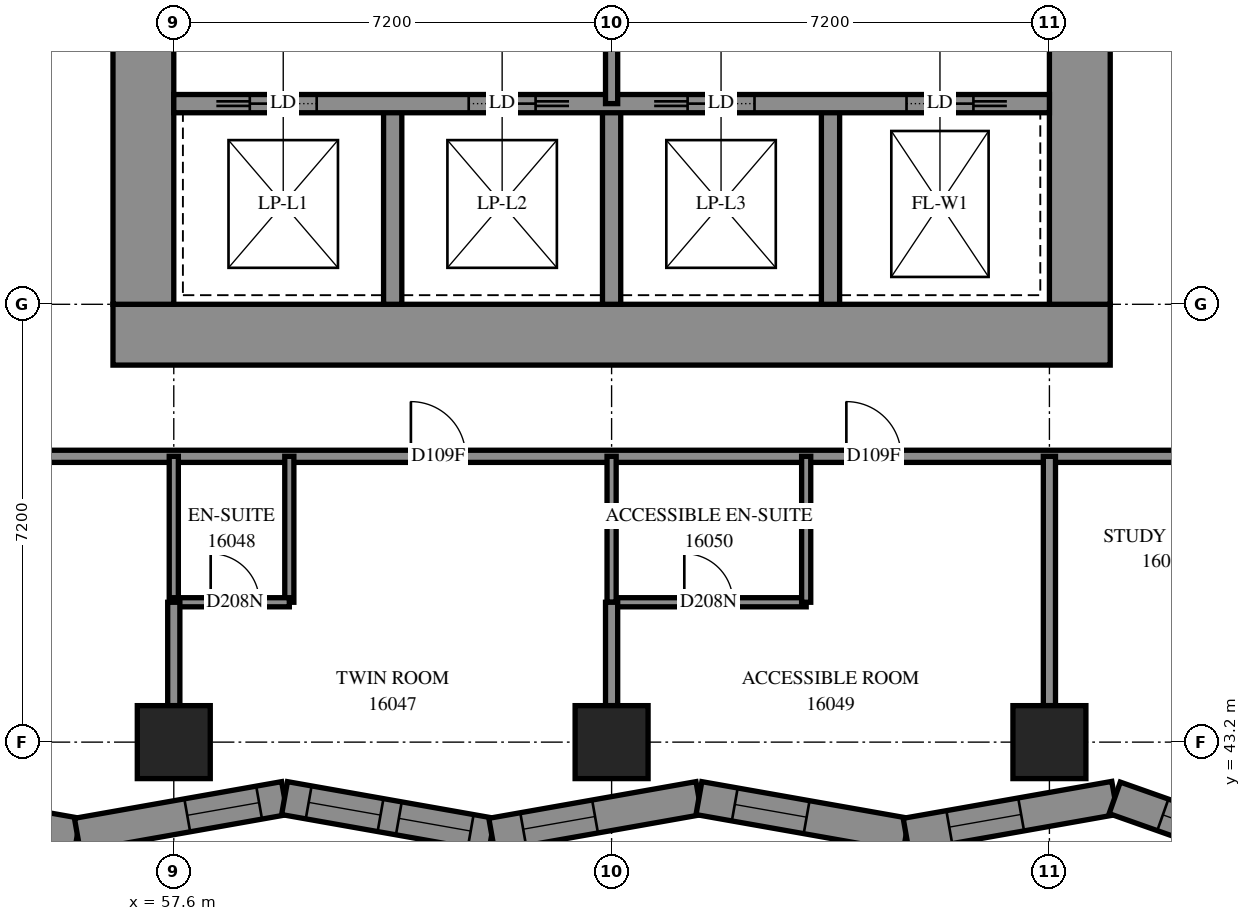
"""IFC4 building model, lengths in metres.
Left out: names, types, materials, properties, quantities, classifications, styles, units other than length and angle.
Written with IfcOpenShell. Run it as: python <this file> out.ifc"""

import sys

from ifc_helpers import new_model, si_unit, direction, frame, frame_2d, origin, origin_2d, place, context, subcontext, project, spatial, polyline, rectangle, outline, extrude, element, fill, save


model = new_model("IFC4")
c1 = context("Model", 3, precision=1e-05, world=origin(), true_north=direction((0.0, 1.0)))
c2 = subcontext(c1, "Body", "Model", "MODEL_VIEW")
j1 = project(units=[si_unit("LENGTHUNIT", "METRE"), si_unit("PLANEANGLEUNIT", "RADIAN")], contexts=[c1])
p1 = place(None, origin())
s1 = spatial("IfcSite", under=j1, at=p1, CompositionType="ELEMENT")
p2 = place(p1, origin())
s2 = spatial("IfcBuilding", under=s1, at=p2, CompositionType="ELEMENT")
p3 = place(p2, frame((0.0, 0.0, 61.0)))
s3 = spatial("IfcBuildingStorey", under=s2, at=p3, CompositionType="ELEMENT", Elevation=61.0)
for number, where, z_axis, x_axis in (
    (1, (57.6, 43.2, 0.0), (0.0, 0.0, 1.0), (1.0, 0.0, 0.0)),
    (2, (64.8, 43.2, 0.0), (0.0, 0.0, 1.0), (1.0, 0.0, 0.0)),
    (3, (72.0, 43.2, 0.0), (0.0, 0.0, 1.0), (1.0, 0.0, 0.0)),
):
    element("IfcColumn", number, at=place(p3, frame(where, z_axis=z_axis, x_axis=x_axis)), inside=s3, PredefinedType="COLUMN", context=c2, shape_type="SweptSolid", body=[
        extrude(rectangle(XDim=1.2, YDim=1.2, at=origin_2d()), origin(), (0.0, 0.0, 1.0), 3.1),
    ])
p4 = place(p3, frame((56.6, 49.9, -0.3), z_axis=(0.0, 0.0, 1.0), x_axis=(1.0, 0.0, 0.0)))
e4 = element("IfcWall", 4, at=p4, inside=s3, PredefinedType="SHEAR", context=c2, shape_type="SweptSolid", body=[
    extrude(rectangle(XDim=16.4, YDim=1.0, at=frame_2d((8.2, 0.0))), origin(), (0.0, 0.0, 1.0), 2.7),
])
p5 = place(p3, frame((57.1, 50.4, -0.3), z_axis=(0.0, 0.0, 1.0), x_axis=(0.0, 1.0, 0.0)))
e5 = element("IfcWall", 5, at=p5, inside=s3, PredefinedType="SHEAR", context=c2, shape_type="SweptSolid", body=[
    extrude(rectangle(XDim=14.4, YDim=1.0, at=frame_2d((7.2, 0.0))), origin(), (0.0, 0.0, 1.0), 2.7),
])
p6 = place(p5, frame((4.55, 0.0, 0.3)))
e6 = element("IfcOpeningElement", 6, at=p6, cuts=e5, PredefinedType="OPENING", context=c2, shape_type="SweptSolid", body=[
    extrude(rectangle(XDim=1.1, YDim=2.1, at=frame_2d((0.55, 1.05))), frame((0.0, 0.51, 0.0), z_axis=(0.0, -1.0, 0.0), x_axis=(1.0, 0.0, 0.0)), (0.0, 0.0, 1.0), 1.02),
])
p7 = place(p5, frame((11.35, 0.0, 0.3)))
e7 = element("IfcOpeningElement", 7, at=p7, cuts=e5, PredefinedType="OPENING", context=c2, shape_type="SweptSolid", body=[
    extrude(rectangle(XDim=1.1, YDim=2.1, at=frame_2d((0.55, 1.05))), frame((0.0, 0.51, 0.0), z_axis=(0.0, -1.0, 0.0), x_axis=(1.0, 0.0, 0.0)), (0.0, 0.0, 1.0), 1.02),
])
p8 = place(p3, frame((72.5, 50.4, -0.3), z_axis=(0.0, 0.0, 1.0), x_axis=(0.0, 1.0, 0.0)))
e8 = element("IfcWall", 8, at=p8, inside=s3, PredefinedType="SHEAR", context=c2, shape_type="SweptSolid", body=[
    extrude(rectangle(XDim=14.4, YDim=1.0, at=frame_2d((7.2, 0.0))), origin(), (0.0, 0.0, 1.0), 2.7),
])
p9 = place(p8, frame((4.55, 0.0, 0.3)))
e9 = element("IfcOpeningElement", 9, at=p9, cuts=e8, PredefinedType="OPENING", context=c2, shape_type="SweptSolid", body=[
    extrude(rectangle(XDim=1.1, YDim=2.1, at=frame_2d((0.55, 1.05))), frame((0.0, 0.51, 0.0), z_axis=(0.0, -1.0, 0.0), x_axis=(1.0, 0.0, 0.0)), (0.0, 0.0, 1.0), 1.02),
])
p10 = place(p8, frame((11.35, 0.0, 0.3)))
e10 = element("IfcOpeningElement", 10, at=p10, cuts=e8, PredefinedType="OPENING", context=c2, shape_type="SweptSolid", body=[
    extrude(rectangle(XDim=1.1, YDim=2.1, at=frame_2d((0.55, 1.05))), frame((0.0, 0.51, 0.0), z_axis=(0.0, -1.0, 0.0), x_axis=(1.0, 0.0, 0.0)), (0.0, 0.0, 1.0), 1.02),
])
for number, where, z_axis, x_axis in (
    (11, (61.2, 50.4, 0.0), (0.0, 0.0, 1.0), (0.0, 1.0, 0.0)),
    (12, (64.8, 50.4, 0.0), (0.0, 0.0, 1.0), (0.0, 1.0, 0.0)),
    (13, (68.4, 50.4, 0.0), (0.0, 0.0, 1.0), (0.0, 1.0, 0.0)),
):
    element("IfcWall", number, at=place(p3, frame(where, z_axis=z_axis, x_axis=x_axis)), inside=s3, PredefinedType="SOLIDWALL", context=c2, shape_type="SweptSolid", body=[
        extrude(rectangle(XDim=3.3, YDim=0.3, at=frame_2d((1.65, 0.0))), origin(), (0.0, 0.0, 1.0), 3.1),
    ])
p11 = place(p3, frame((57.6, 53.7, 0.0), z_axis=(0.0, 0.0, 1.0), x_axis=(1.0, 0.0, 0.0)))
e14 = element("IfcWall", 14, at=p11, inside=s3, PredefinedType="SOLIDWALL", context=c2, shape_type="SweptSolid", body=[
    extrude(rectangle(XDim=14.4, YDim=0.3, at=frame_2d((7.2, 0.0))), origin(), (0.0, 0.0, 1.0), 3.1),
])
p12 = place(p11, frame((1.25, 0.0, 0.0)))
e15 = element("IfcOpeningElement", 15, at=p12, cuts=e14, PredefinedType="OPENING", context=c2, shape_type="SweptSolid", body=[
    extrude(rectangle(XDim=1.1, YDim=2.1, at=frame_2d((0.55, 1.05))), frame((0.0, 0.16, 0.0), z_axis=(0.0, -1.0, 0.0), x_axis=(1.0, 0.0, 0.0)), (0.0, 0.0, 1.0), 0.32),
])
p13 = place(p11, frame((4.85, 0.0, 0.0)))
e16 = element("IfcOpeningElement", 16, at=p13, cuts=e14, PredefinedType="OPENING", context=c2, shape_type="SweptSolid", body=[
    extrude(rectangle(XDim=1.1, YDim=2.1, at=frame_2d((0.55, 1.05))), frame((0.0, 0.16, 0.0), z_axis=(0.0, -1.0, 0.0), x_axis=(1.0, 0.0, 0.0)), (0.0, 0.0, 1.0), 0.32),
])
p14 = place(p11, frame((8.45, 0.0, 0.0)))
e17 = element("IfcOpeningElement", 17, at=p14, cuts=e14, PredefinedType="OPENING", context=c2, shape_type="SweptSolid", body=[
    extrude(rectangle(XDim=1.1, YDim=2.1, at=frame_2d((0.55, 1.05))), frame((0.0, 0.16, 0.0), z_axis=(0.0, -1.0, 0.0), x_axis=(1.0, 0.0, 0.0)), (0.0, 0.0, 1.0), 0.32),
])
p15 = place(p11, frame((12.05, 0.0, 0.0)))
e18 = element("IfcOpeningElement", 18, at=p15, cuts=e14, PredefinedType="OPENING", context=c2, shape_type="SweptSolid", body=[
    extrude(rectangle(XDim=1.1, YDim=2.1, at=frame_2d((0.55, 1.05))), frame((0.0, 0.16, 0.0), z_axis=(0.0, -1.0, 0.0), x_axis=(1.0, 0.0, 0.0)), (0.0, 0.0, 1.0), 0.32),
])
p16 = place(p3, frame((52.584, 42.283, 0.0), z_axis=(0.0, 0.0, 1.0), x_axis=(0.9846990638, -0.1742634606, 0.0)))
e19 = element("IfcWall", 19, at=p16, inside=s3, PredefinedType="SOLIDWALL", context=c2, shape_type="SweptSolid", body=[
    extrude(outline(polyline([(0.072, -0.275), (3.533, -0.275), (3.435, 0.275), (-0.072, 0.275), (0.072, -0.275)])), origin(), (0.0, 0.0, 1.0), 3.1),
])
p17 = place(p16, frame((1.737, 0.0, 0.5)))
e20 = element("IfcOpeningElement", 20, at=p17, cuts=e19, PredefinedType="OPENING", context=c2, shape_type="SweptSolid", body=[
    extrude(rectangle(XDim=1.2, YDim=2.45, at=frame_2d((0.6, 1.225))), frame((0.0, 0.285, 0.0), z_axis=(0.0, -1.0, 0.0), x_axis=(1.0, 0.0, 0.0)), (0.0, 0.0, 1.0), 0.57),
])
p18 = place(p3, frame((56.014, 41.676, 0.0), z_axis=(0.0, 0.0, 1.0), x_axis=(0.9846979018, 0.1742700266, 0.0)))
e21 = element("IfcWall", 21, at=p18, inside=s3, PredefinedType="SOLIDWALL", context=c2, shape_type="SweptSolid", body=[
    extrude(outline(polyline([(-0.049, -0.275), (3.412, -0.275), (3.509, 0.275), (0.049, 0.275), (-0.049, -0.275)])), origin(), (0.0, 0.0, 1.0), 3.1),
])
p19 = place(p18, frame((1.835, 0.0, 0.5)))
e22 = element("IfcOpeningElement", 22, at=p19, cuts=e21, PredefinedType="OPENING", context=c2, shape_type="SweptSolid", body=[
    extrude(rectangle(XDim=1.2, YDim=2.45, at=frame_2d((0.6, 1.225))), frame((0.0, 0.285, 0.0), z_axis=(0.0, -1.0, 0.0), x_axis=(1.0, 0.0, 0.0)), (0.0, 0.0, 1.0), 0.57),
])
p20 = place(p3, frame((59.422, 42.279, 0.0), z_axis=(0.0, 0.0, 1.0), x_axis=(0.9846979018, -0.1742700266, 0.0)))
e23 = element("IfcWall", 23, at=p20, inside=s3, PredefinedType="SOLIDWALL", context=c2, shape_type="SweptSolid", body=[
    extrude(outline(polyline([(0.049, -0.275), (3.509, -0.275), (3.412, 0.275), (-0.049, 0.275), (0.049, -0.275)])), origin(), (0.0, 0.0, 1.0), 3.1),
])
p21 = place(p20, frame((0.403, 0.0, 0.5)))
e24 = element("IfcOpeningElement", 24, at=p21, cuts=e23, PredefinedType="OPENING", context=c2, shape_type="SweptSolid", body=[
    extrude(rectangle(XDim=1.2, YDim=2.45, at=frame_2d((0.6, 1.225))), frame((0.0, 0.285, 0.0), z_axis=(0.0, -1.0, 0.0), x_axis=(1.0, 0.0, 0.0)), (0.0, 0.0, 1.0), 0.57),
])
p22 = place(p20, frame((1.909, 0.0, 0.5)))
e25 = element("IfcOpeningElement", 25, at=p22, cuts=e23, PredefinedType="OPENING", context=c2, shape_type="SweptSolid", body=[
    extrude(rectangle(XDim=1.2, YDim=2.45, at=frame_2d((0.6, 1.225))), frame((0.0, 0.285, 0.0), z_axis=(0.0, -1.0, 0.0), x_axis=(1.0, 0.0, 0.0)), (0.0, 0.0, 1.0), 0.57),
])
p23 = place(p3, frame((62.829, 41.676, 0.0), z_axis=(0.0, 0.0, 1.0), x_axis=(0.9846979018, 0.1742700266, 0.0)))
e26 = element("IfcWall", 26, at=p23, inside=s3, PredefinedType="SOLIDWALL", context=c2, shape_type="SweptSolid", body=[
    extrude(outline(polyline([(-0.049, -0.275), (3.412, -0.275), (3.509, 0.275), (0.049, 0.275), (-0.049, -0.275)])), origin(), (0.0, 0.0, 1.0), 3.1),
])
p24 = place(p23, frame((0.525, 0.0, 0.5)))
e27 = element("IfcOpeningElement", 27, at=p24, cuts=e26, PredefinedType="OPENING", context=c2, shape_type="SweptSolid", body=[
    extrude(rectangle(XDim=1.2, YDim=2.45, at=frame_2d((0.6, 1.225))), frame((0.0, 0.285, 0.0), z_axis=(0.0, -1.0, 0.0), x_axis=(1.0, 0.0, 0.0)), (0.0, 0.0, 1.0), 0.57),
])
p25 = place(p3, frame((66.236, 42.279, 0.0), z_axis=(0.0, 0.0, 1.0), x_axis=(0.9846979018, -0.1742700266, 0.0)))
e28 = element("IfcWall", 28, at=p25, inside=s3, PredefinedType="SOLIDWALL", context=c2, shape_type="SweptSolid", body=[
    extrude(outline(polyline([(0.049, -0.275), (3.509, -0.275), (3.412, 0.275), (-0.049, 0.275), (0.049, -0.275)])), origin(), (0.0, 0.0, 1.0), 3.1),
])
p26 = place(p25, frame((0.599, 0.0, 0.5)))
e29 = element("IfcOpeningElement", 29, at=p26, cuts=e28, PredefinedType="OPENING", context=c2, shape_type="SweptSolid", body=[
    extrude(rectangle(XDim=1.2, YDim=2.45, at=frame_2d((0.6, 1.225))), frame((0.0, 0.285, 0.0), z_axis=(0.0, -1.0, 0.0), x_axis=(1.0, 0.0, 0.0)), (0.0, 0.0, 1.0), 0.57),
])
p27 = place(p3, frame((69.643, 41.676, 0.0), z_axis=(0.0, 0.0, 1.0), x_axis=(0.9846990638, 0.1742634606, 0.0)))
e30 = element("IfcWall", 30, at=p27, inside=s3, PredefinedType="SOLIDWALL", context=c2, shape_type="SweptSolid", body=[
    extrude(outline(polyline([(-0.049, -0.275), (3.412, -0.275), (3.556, 0.275), (0.049, 0.275), (-0.049, -0.275)])), origin(), (0.0, 0.0, 1.0), 3.1),
])
p28 = place(p27, frame((0.721, 0.0, 0.5)))
e31 = element("IfcOpeningElement", 31, at=p28, cuts=e30, PredefinedType="OPENING", context=c2, shape_type="SweptSolid", body=[
    extrude(rectangle(XDim=1.2, YDim=2.45, at=frame_2d((0.6, 1.225))), frame((0.0, 0.285, 0.0), z_axis=(0.0, -1.0, 0.0), x_axis=(1.0, 0.0, 0.0)), (0.0, 0.0, 1.0), 0.57),
])
p29 = place(p3, frame((73.074, 42.283, 0.0), z_axis=(0.0, 0.0, 1.0), x_axis=(0.9429519654, -0.3329288077, 0.0)))
e32 = element("IfcWall", 32, at=p29, inside=s3, PredefinedType="SOLIDWALL", context=c2, shape_type="SweptSolid", body=[
    extrude(outline(polyline([(0.072, -0.275), (3.686, -0.275), (3.725, 0.275), (-0.072, 0.275), (0.072, -0.275)])), origin(), (0.0, 0.0, 1.0), 3.1),
])
p30 = place(p29, frame((0.84, 0.0, 0.5)))
e33 = element("IfcOpeningElement", 33, at=p30, cuts=e32, PredefinedType="OPENING", context=c2, shape_type="SweptSolid", body=[
    extrude(rectangle(XDim=1.2, YDim=2.45, at=frame_2d((0.6, 1.225))), frame((0.0, 0.285, 0.0), z_axis=(0.0, -1.0, 0.0), x_axis=(1.0, 0.0, 0.0)), (0.0, 0.0, 1.0), 0.57),
])
p31 = place(p3, frame((64.8, 53.7, 0.0), z_axis=(0.0, 0.0, 1.0), x_axis=(0.0, 1.0, 0.0)))
e34 = element("IfcWall", 34, at=p31, inside=s3, PredefinedType="PARTITIONING", context=c2, shape_type="SweptSolid", body=[
    extrude(rectangle(XDim=3.6, YDim=0.2, at=frame_2d((1.8, 0.0))), origin(), (0.0, 0.0, 1.0), 3.1),
])
p32 = place(p3, frame((55.1, 47.9, 0.0), z_axis=(0.0, 0.0, 1.0), x_axis=(1.0, 0.0, 0.0)))
e35 = element("IfcWall", 35, at=p32, inside=s3, PredefinedType="PARTITIONING", context=c2, shape_type="SweptSolid", body=[
    extrude(rectangle(XDim=19.208, YDim=0.2, at=frame_2d((9.604, 0.0))), origin(), (0.0, 0.0, 1.0), 3.1),
])
p33 = place(p32, frame((6.399, 0.0, 0.0)))
e36 = element("IfcOpeningElement", 36, at=p33, cuts=e35, PredefinedType="OPENING", context=c2, shape_type="SweptSolid", body=[
    extrude(rectangle(XDim=0.9, YDim=2.1, at=frame_2d((0.45, 1.05))), frame((0.0, 0.11, 0.0), z_axis=(0.0, -1.0, 0.0), x_axis=(1.0, 0.0, 0.0)), (0.0, 0.0, 1.0), 0.22),
])
p34 = place(p32, frame((13.561, 0.0, 0.0)))
e37 = element("IfcOpeningElement", 37, at=p34, cuts=e35, PredefinedType="OPENING", context=c2, shape_type="SweptSolid", body=[
    extrude(rectangle(XDim=0.9, YDim=2.1, at=frame_2d((0.45, 1.05))), frame((0.0, 0.11, 0.0), z_axis=(0.0, -1.0, 0.0), x_axis=(1.0, 0.0, 0.0)), (0.0, 0.0, 1.0), 0.22),
])
p35 = place(p3, frame((72.0, 43.8, 0.0), z_axis=(0.0, 0.0, 1.0), x_axis=(0.0, 1.0, 0.0)))
e38 = element("IfcWall", 38, at=p35, inside=s3, PredefinedType="PARTITIONING", context=c2, shape_type="SweptSolid", body=[
    extrude(rectangle(XDim=4.1, YDim=0.2, at=frame_2d((2.05, 0.0))), origin(), (0.0, 0.0, 1.0), 3.1),
])
p36 = place(p3, frame((64.8, 45.5, 0.0), z_axis=(0.0, 0.0, 1.0), x_axis=(1.0, 0.0, 0.0)))
e39 = element("IfcWall", 39, at=p36, inside=s3, PredefinedType="PARTITIONING", context=c2, shape_type="SweptSolid", body=[
    extrude(rectangle(XDim=3.2, YDim=0.15, at=frame_2d((1.6, 0.0))), origin(), (0.0, 0.0, 1.0), 3.1),
])
p37 = place(p36, frame((1.196, 0.0, 0.0)))
e40 = element("IfcOpeningElement", 40, at=p37, cuts=e39, PredefinedType="OPENING", context=c2, shape_type="SweptSolid", body=[
    extrude(rectangle(XDim=0.8, YDim=2.1, at=frame_2d((0.4, 1.05))), frame((0.0, 0.085, 0.0), z_axis=(0.0, -1.0, 0.0), x_axis=(1.0, 0.0, 0.0)), (0.0, 0.0, 1.0), 0.17),
])
for number, where, z_axis, x_axis in (
    (41, (59.5, 45.5, 0.0), (0.0, 0.0, 1.0), (0.0, 1.0, 0.0)),
    (42, (57.6, 45.5, 0.0), (0.0, 0.0, 1.0), (0.0, 1.0, 0.0)),
    (43, (68.0, 45.5, 0.0), (0.0, 0.0, 1.0), (0.0, 1.0, 0.0)),
    (44, (64.8, 45.5, 0.0), (0.0, 0.0, 1.0), (0.0, 1.0, 0.0)),
):
    element("IfcWall", number, at=place(p3, frame(where, z_axis=z_axis, x_axis=x_axis)), inside=s3, PredefinedType="PARTITIONING", context=c2, shape_type="SweptSolid", body=[
        extrude(rectangle(XDim=2.4, YDim=0.15, at=frame_2d((1.2, 0.0))), origin(), (0.0, 0.0, 1.0), 3.1),
    ])
p38 = place(p3, frame((57.6, 45.5, 0.0), z_axis=(0.0, 0.0, 1.0), x_axis=(1.0, 0.0, 0.0)))
e45 = element("IfcWall", 45, at=p38, inside=s3, PredefinedType="PARTITIONING", context=c2, shape_type="SweptSolid", body=[
    extrude(rectangle(XDim=1.9, YDim=0.15, at=frame_2d((0.95, 0.0))), origin(), (0.0, 0.0, 1.0), 3.1),
])
p39 = place(p38, frame((0.607, 0.0, 0.0)))
e46 = element("IfcOpeningElement", 46, at=p39, cuts=e45, PredefinedType="OPENING", context=c2, shape_type="SweptSolid", body=[
    extrude(rectangle(XDim=0.8, YDim=2.1, at=frame_2d((0.4, 1.05))), frame((0.0, 0.085, 0.0), z_axis=(0.0, -1.0, 0.0), x_axis=(1.0, 0.0, 0.0)), (0.0, 0.0, 1.0), 0.17),
])
for number, where, z_axis, x_axis in (
    (47, (57.6, 43.8, 0.0), (0.0, 0.0, 1.0), (0.0, 1.0, 0.0)),
    (48, (64.8, 43.8, 0.0), (0.0, 0.0, 1.0), (0.0, 1.0, 0.0)),
):
    element("IfcWall", number, at=place(p3, frame(where, z_axis=z_axis, x_axis=x_axis)), inside=s3, PredefinedType="PARTITIONING", context=c2, shape_type="SweptSolid", body=[
        extrude(rectangle(XDim=1.7, YDim=0.2, at=frame_2d((0.85, 0.0))), origin(), (0.0, 0.0, 1.0), 3.1),
    ])
p40 = place(p19, origin())
e49 = element("IfcWindow", 49, at=p40, inside=s3, PartitioningType="SINGLE_PANEL", PredefinedType="WINDOW", context=c2, shape_type="SweptSolid", body=[
    extrude(rectangle(XDim=1.2, YDim=2.45, at=frame_2d((0.6, 1.225))), frame((0.0, 0.155, 0.0), z_axis=(0.0, -1.0, 0.0), x_axis=(1.0, 0.0, 0.0)), (0.0, 0.0, 1.0), 0.06),
])
fill(e22, e49)
p41 = place(p21, origin())
e50 = element("IfcWindow", 50, at=p41, inside=s3, PartitioningType="SINGLE_PANEL", PredefinedType="WINDOW", context=c2, shape_type="SweptSolid", body=[
    extrude(rectangle(XDim=1.2, YDim=2.45, at=frame_2d((0.6, 1.225))), frame((0.0, 0.155, 0.0), z_axis=(0.0, -1.0, 0.0), x_axis=(1.0, 0.0, 0.0)), (0.0, 0.0, 1.0), 0.06),
])
fill(e24, e50)
p42 = place(p22, origin())
e51 = element("IfcWindow", 51, at=p42, inside=s3, PartitioningType="SINGLE_PANEL", PredefinedType="WINDOW", context=c2, shape_type="SweptSolid", body=[
    extrude(rectangle(XDim=1.2, YDim=2.45, at=frame_2d((0.6, 1.225))), frame((0.0, 0.155, 0.0), z_axis=(0.0, -1.0, 0.0), x_axis=(1.0, 0.0, 0.0)), (0.0, 0.0, 1.0), 0.06),
])
fill(e25, e51)
p43 = place(p24, origin())
e52 = element("IfcWindow", 52, at=p43, inside=s3, PartitioningType="SINGLE_PANEL", PredefinedType="WINDOW", context=c2, shape_type="SweptSolid", body=[
    extrude(rectangle(XDim=1.2, YDim=2.45, at=frame_2d((0.6, 1.225))), frame((0.0, 0.155, 0.0), z_axis=(0.0, -1.0, 0.0), x_axis=(1.0, 0.0, 0.0)), (0.0, 0.0, 1.0), 0.06),
])
fill(e27, e52)
p44 = place(p26, origin())
e53 = element("IfcWindow", 53, at=p44, inside=s3, PartitioningType="SINGLE_PANEL", PredefinedType="WINDOW", context=c2, shape_type="SweptSolid", body=[
    extrude(rectangle(XDim=1.2, YDim=2.45, at=frame_2d((0.6, 1.225))), frame((0.0, 0.155, 0.0), z_axis=(0.0, -1.0, 0.0), x_axis=(1.0, 0.0, 0.0)), (0.0, 0.0, 1.0), 0.06),
])
fill(e29, e53)
p45 = place(p28, origin())
e54 = element("IfcWindow", 54, at=p45, inside=s3, PartitioningType="SINGLE_PANEL", PredefinedType="WINDOW", context=c2, shape_type="SweptSolid", body=[
    extrude(rectangle(XDim=1.2, YDim=2.45, at=frame_2d((0.6, 1.225))), frame((0.0, 0.155, 0.0), z_axis=(0.0, -1.0, 0.0), x_axis=(1.0, 0.0, 0.0)), (0.0, 0.0, 1.0), 0.06),
])
fill(e31, e54)
p46 = place(p30, origin())
e55 = element("IfcWindow", 55, at=p46, inside=s3, PartitioningType="SINGLE_PANEL", PredefinedType="WINDOW", context=c2, shape_type="SweptSolid", body=[
    extrude(rectangle(XDim=1.2, YDim=2.45, at=frame_2d((0.6, 1.225))), frame((0.0, 0.155, 0.0), z_axis=(0.0, -1.0, 0.0), x_axis=(1.0, 0.0, 0.0)), (0.0, 0.0, 1.0), 0.06),
])
fill(e33, e55)
p47 = place(p12, origin())
e56 = element("IfcDoor", 56, at=p47, inside=s3, OperationType="SLIDING_TO_LEFT", PredefinedType="DOOR", context=c2, shape_type="SweptSolid", body=[
    extrude(rectangle(XDim=1.1, YDim=2.1, at=frame_2d((0.55, 1.05))), frame((0.0, 0.025, 0.0), z_axis=(0.0, -1.0, 0.0), x_axis=(1.0, 0.0, 0.0)), (0.0, 0.0, 1.0), 0.05),
])
fill(e15, e56)
p48 = place(p13, origin())
e57 = element("IfcDoor", 57, at=p48, inside=s3, OperationType="SLIDING_TO_RIGHT", PredefinedType="DOOR", context=c2, shape_type="SweptSolid", body=[
    extrude(rectangle(XDim=1.1, YDim=2.1, at=frame_2d((0.55, 1.05))), frame((0.0, 0.025, 0.0), z_axis=(0.0, -1.0, 0.0), x_axis=(1.0, 0.0, 0.0)), (0.0, 0.0, 1.0), 0.05),
])
fill(e16, e57)
p49 = place(p14, origin())
e58 = element("IfcDoor", 58, at=p49, inside=s3, OperationType="SLIDING_TO_LEFT", PredefinedType="DOOR", context=c2, shape_type="SweptSolid", body=[
    extrude(rectangle(XDim=1.1, YDim=2.1, at=frame_2d((0.55, 1.05))), frame((0.0, 0.025, 0.0), z_axis=(0.0, -1.0, 0.0), x_axis=(1.0, 0.0, 0.0)), (0.0, 0.0, 1.0), 0.05),
])
fill(e17, e58)
p50 = place(p15, origin())
e59 = element("IfcDoor", 59, at=p50, inside=s3, OperationType="SLIDING_TO_RIGHT", PredefinedType="DOOR", context=c2, shape_type="SweptSolid", body=[
    extrude(rectangle(XDim=1.1, YDim=2.1, at=frame_2d((0.55, 1.05))), frame((0.0, 0.025, 0.0), z_axis=(0.0, -1.0, 0.0), x_axis=(1.0, 0.0, 0.0)), (0.0, 0.0, 1.0), 0.05),
])
fill(e18, e59)
p51 = place(p33, origin())
e60 = element("IfcDoor", 60, at=p51, inside=s3, OperationType="SINGLE_SWING_LEFT", PredefinedType="DOOR", context=c2, shape_type="SweptSolid", body=[
    extrude(rectangle(XDim=0.9, YDim=2.1, at=frame_2d((0.45, 1.05))), frame((0.0, 0.025, 0.0), z_axis=(0.0, -1.0, 0.0), x_axis=(1.0, 0.0, 0.0)), (0.0, 0.0, 1.0), 0.05),
])
fill(e36, e60)
p52 = place(p39, origin())
e61 = element("IfcDoor", 61, at=p52, inside=s3, OperationType="SINGLE_SWING_RIGHT", PredefinedType="DOOR", context=c2, shape_type="SweptSolid", body=[
    extrude(rectangle(XDim=0.8, YDim=2.1, at=frame_2d((0.4, 1.05))), frame((0.0, 0.025, 0.0), z_axis=(0.0, -1.0, 0.0), x_axis=(1.0, 0.0, 0.0)), (0.0, 0.0, 1.0), 0.05),
])
fill(e46, e61)
p53 = place(p34, origin())
e62 = element("IfcDoor", 62, at=p53, inside=s3, OperationType="SINGLE_SWING_LEFT", PredefinedType="DOOR", context=c2, shape_type="SweptSolid", body=[
    extrude(rectangle(XDim=0.9, YDim=2.1, at=frame_2d((0.45, 1.05))), frame((0.0, 0.025, 0.0), z_axis=(0.0, -1.0, 0.0), x_axis=(1.0, 0.0, 0.0)), (0.0, 0.0, 1.0), 0.05),
])
fill(e37, e62)
p54 = place(p37, origin())
e63 = element("IfcDoor", 63, at=p54, inside=s3, OperationType="SINGLE_SWING_RIGHT", PredefinedType="DOOR", context=c2, shape_type="SweptSolid", body=[
    extrude(rectangle(XDim=0.8, YDim=2.1, at=frame_2d((0.4, 1.05))), frame((0.0, 0.025, 0.0), z_axis=(0.0, -1.0, 0.0), x_axis=(1.0, 0.0, 0.0)), (0.0, 0.0, 1.0), 0.05),
])
fill(e40, e63)
save(model, sys.argv[1])
